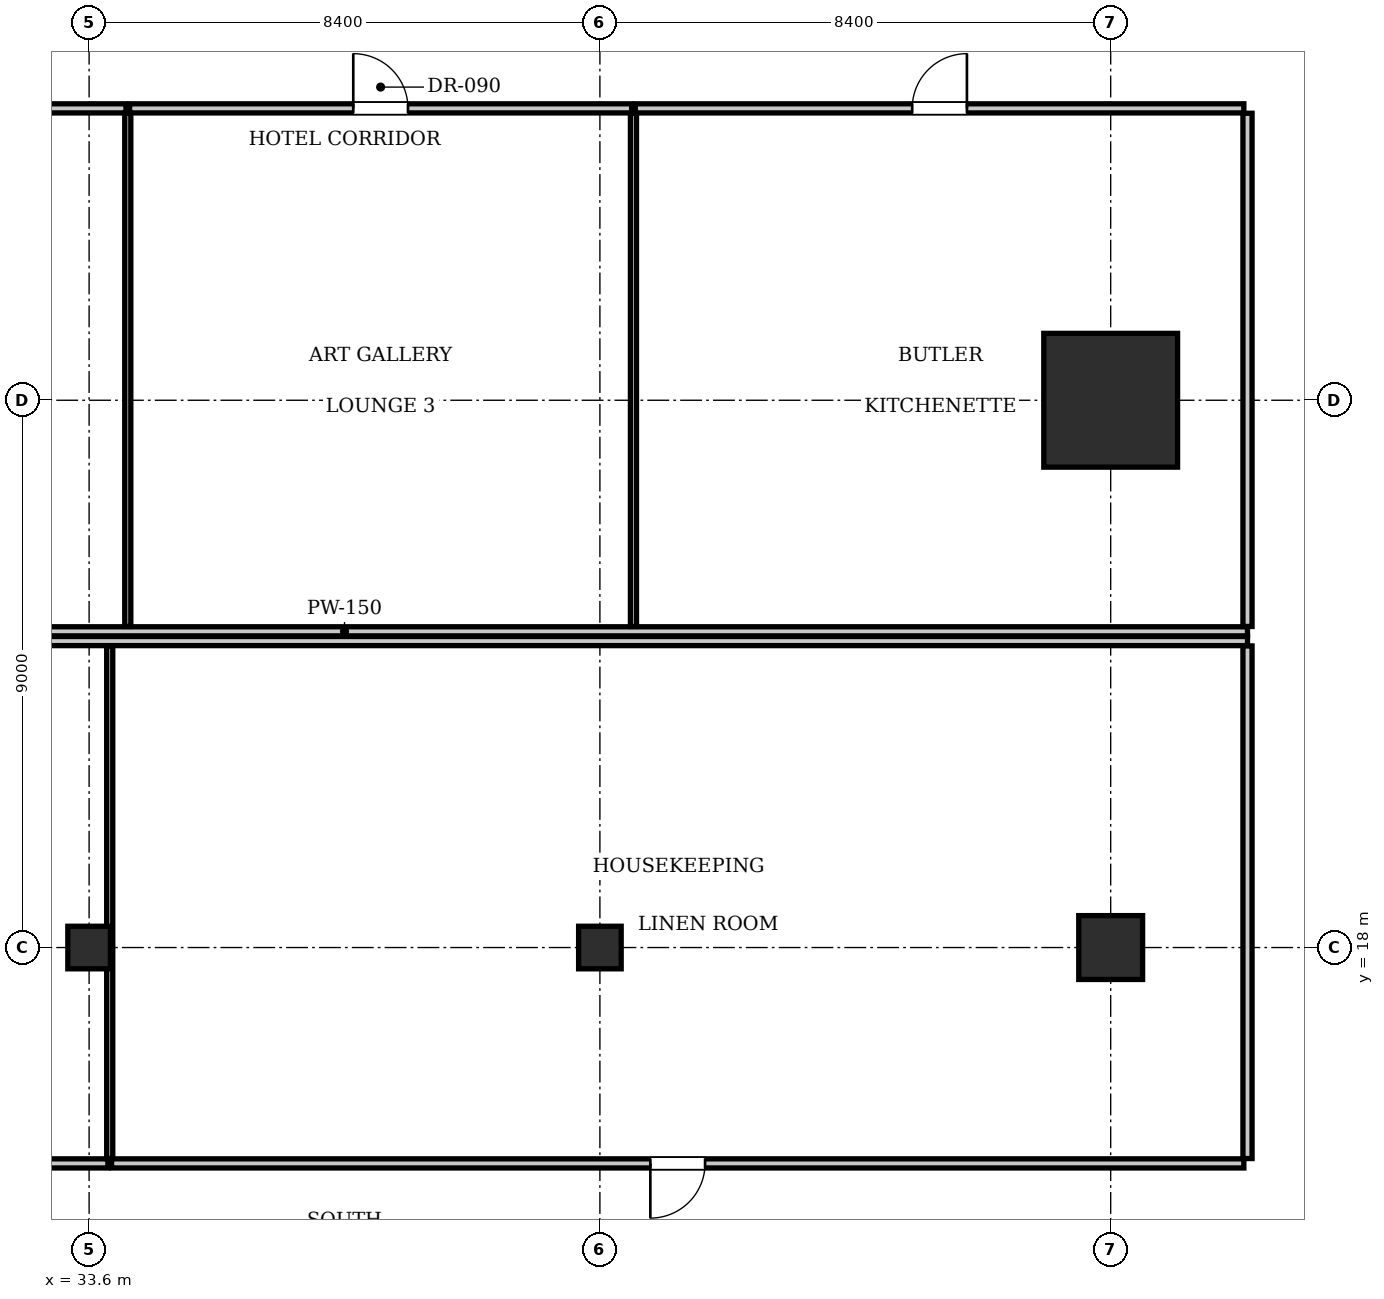
"""IFC4 building model, lengths in metres.
Left out: names, types, materials, properties, quantities, classifications, styles, units other than length and angle.
Written with IfcOpenShell. Run it as: python <this file> out.ifc"""

import sys

from ifc_helpers import new_model, si_unit, direction, frame, frame_2d, origin, origin_2d, place, context, subcontext, project, spatial, rectangle, i_section, extrude, element, fill, save


model = new_model("IFC4")
c1 = context("Model", 3, precision=1e-05, world=origin(), true_north=direction((0.0, 1.0)))
c2 = subcontext(c1, "Body", "Model", "MODEL_VIEW")
j1 = project(units=[si_unit("LENGTHUNIT", "METRE"), si_unit("PLANEANGLEUNIT", "RADIAN")], contexts=[c1])
p1 = place(None, origin())
s1 = spatial("IfcSite", under=j1, at=p1, CompositionType="ELEMENT")
p2 = place(p1, origin())
s2 = spatial("IfcBuilding", under=s1, at=p2, CompositionType="ELEMENT")
p3 = place(p2, frame((0.0, 0.0, 88.55)))
s3 = spatial("IfcBuildingStorey", under=s2, at=p3, CompositionType="ELEMENT", Elevation=88.55)
p4 = place(p3, frame((50.4, 27.0, 0.0), z_axis=(0.0, 0.0, 1.0), x_axis=(1.0, 0.0, 0.0)))
e1 = element("IfcColumn", 1, at=p4, inside=s3, PredefinedType="COLUMN", context=c2, shape_type="SweptSolid", body=[
    extrude(rectangle(XDim=2.2, YDim=2.2, at=origin_2d()), origin(), (0.0, 0.0, 1.0), 3.85),
])
p5 = place(p3, frame((50.4, 18.0, 0.0), z_axis=(0.0, 0.0, 1.0), x_axis=(1.0, 0.0, 0.0)))
e2 = element("IfcColumn", 2, at=p5, inside=s3, PredefinedType="COLUMN", context=c2, shape_type="SweptSolid", body=[
    extrude(rectangle(XDim=1.05, YDim=1.05, at=origin_2d()), origin(), (0.0, 0.0, 1.0), 3.85),
])
for number, where, z_axis, x_axis in (
    (3, (33.6, 18.0, 0.0), (0.0, 0.0, 1.0), (1.0, 0.0, 0.0)),
    (4, (42.0, 18.0, 0.0), (0.0, 0.0, 1.0), (1.0, 0.0, 0.0)),
):
    element("IfcColumn", number, at=place(p3, frame(where, z_axis=z_axis, x_axis=x_axis)), inside=s3, PredefinedType="COLUMN", context=c2, shape_type="SweptSolid", body=[
        extrude(i_section(OverallWidth=0.7, OverallDepth=0.7, WebThickness=0.028, FlangeThickness=0.044, at=origin_2d()), origin(), (0.0, 0.0, 1.0), 3.85),
    ])
p6 = place(p3, frame((22.95, 23.2, 0.0), z_axis=(0.0, 0.0, 1.0), x_axis=(1.0, 0.0, 0.0)))
e5 = element("IfcWall", 5, at=p6, inside=s3, PredefinedType="PARTITIONING", context=c2, shape_type="SweptSolid", body=[
    extrude(rectangle(XDim=29.7, YDim=0.15, at=frame_2d((14.85, 0.0))), origin(), (0.0, 0.0, 1.0), 3.61),
])
p7 = place(p3, frame((52.65, 23.28, 0.0), z_axis=(0.0, 0.0, 1.0), x_axis=(0.0, 1.0, 0.0)))
e6 = element("IfcWall", 6, at=p7, inside=s3, PredefinedType="PARTITIONING", context=c2, shape_type="SweptSolid", body=[
    extrude(rectangle(XDim=8.44, YDim=0.15, at=frame_2d((4.22, 0.0))), origin(), (0.0, 0.0, 1.0), 3.61),
])
p8 = place(p3, frame((27.732, 31.8, 0.0), z_axis=(0.0, 0.0, 1.0), x_axis=(1.0, 0.0, 0.0)))
e7 = element("IfcWall", 7, at=p8, inside=s3, PredefinedType="PARTITIONING", context=c2, shape_type="SweptSolid", body=[
    extrude(rectangle(XDim=6.474, YDim=0.15, at=frame_2d((3.237, 0.0))), origin(), (0.0, 0.0, 1.0), 3.61),
])
p9 = place(p8, frame((2.787, 0.0, 0.0)))
e8 = element("IfcOpeningElement", 8, at=p9, cuts=e7, PredefinedType="OPENING", context=c2, shape_type="SweptSolid", body=[
    extrude(rectangle(XDim=0.9, YDim=2.1, at=frame_2d((0.45, 1.05))), frame((0.0, 0.085, 0.0), z_axis=(0.0, -1.0, 0.0), x_axis=(1.0, 0.0, 0.0)), (0.0, 0.0, 1.0), 0.17),
])
p10 = place(p3, frame((34.236, 23.28, 0.0), z_axis=(0.0, 0.0, 1.0), x_axis=(0.0, 1.0, 0.0)))
e9 = element("IfcWall", 9, at=p10, inside=s3, PredefinedType="PARTITIONING", context=c2, shape_type="SweptSolid", body=[
    extrude(rectangle(XDim=8.44, YDim=0.1, at=frame_2d((4.22, 0.0))), origin(), (0.0, 0.0, 1.0), 3.61),
])
p11 = place(p3, frame((34.266, 31.8, 0.0), z_axis=(0.0, 0.0, 1.0), x_axis=(1.0, 0.0, 0.0)))
e10 = element("IfcWall", 10, at=p11, inside=s3, PredefinedType="PARTITIONING", context=c2, shape_type="SweptSolid", body=[
    extrude(rectangle(XDim=8.256, YDim=0.15, at=frame_2d((4.128, 0.0))), origin(), (0.0, 0.0, 1.0), 3.61),
])
p12 = place(p11, frame((3.678, 0.0, 0.0)))
e11 = element("IfcOpeningElement", 11, at=p12, cuts=e10, PredefinedType="OPENING", context=c2, shape_type="SweptSolid", body=[
    extrude(rectangle(XDim=0.9, YDim=2.1, at=frame_2d((0.45, 1.05))), frame((0.0, 0.085, 0.0), z_axis=(0.0, -1.0, 0.0), x_axis=(1.0, 0.0, 0.0)), (0.0, 0.0, 1.0), 0.17),
])
p13 = place(p3, frame((42.552, 23.28, 0.0), z_axis=(0.0, 0.0, 1.0), x_axis=(0.0, 1.0, 0.0)))
e12 = element("IfcWall", 12, at=p13, inside=s3, PredefinedType="PARTITIONING", context=c2, shape_type="SweptSolid", body=[
    extrude(rectangle(XDim=8.44, YDim=0.1, at=frame_2d((4.22, 0.0))), origin(), (0.0, 0.0, 1.0), 3.61),
])
p14 = place(p3, frame((42.582, 31.8, 0.0), z_axis=(0.0, 0.0, 1.0), x_axis=(1.0, 0.0, 0.0)))
e13 = element("IfcWall", 13, at=p14, inside=s3, PredefinedType="PARTITIONING", context=c2, shape_type="SweptSolid", body=[
    extrude(rectangle(XDim=10.008, YDim=0.15, at=frame_2d((5.004, 0.0))), origin(), (0.0, 0.0, 1.0), 3.61),
])
p15 = place(p14, frame((4.554, 0.0, 0.0)))
e14 = element("IfcOpeningElement", 14, at=p15, cuts=e13, PredefinedType="OPENING", context=c2, shape_type="SweptSolid", body=[
    extrude(rectangle(XDim=0.9, YDim=2.1, at=frame_2d((0.45, 1.05))), frame((0.0, 0.085, 0.0), z_axis=(0.0, -1.0, 0.0), x_axis=(1.0, 0.0, 0.0)), (0.0, 0.0, 1.0), 0.17),
])
p16 = place(p3, frame((22.95, 23.04, 0.0), z_axis=(0.0, 0.0, 1.0), x_axis=(1.0, 0.0, 0.0)))
e15 = element("IfcWall", 15, at=p16, inside=s3, PredefinedType="PARTITIONING", context=c2, shape_type="SweptSolid", body=[
    extrude(rectangle(XDim=29.7, YDim=0.15, at=frame_2d((14.85, 0.0))), origin(), (0.0, 0.0, 1.0), 3.61),
])
p17 = place(p3, frame((52.65, 14.53, 0.0), z_axis=(0.0, 0.0, 1.0), x_axis=(0.0, 1.0, 0.0)))
e16 = element("IfcWall", 16, at=p17, inside=s3, PredefinedType="PARTITIONING", context=c2, shape_type="SweptSolid", body=[
    extrude(rectangle(XDim=8.43, YDim=0.15, at=frame_2d((4.215, 0.0))), origin(), (0.0, 0.0, 1.0), 3.61),
])
p18 = place(p3, frame((23.01, 14.45, 0.0), z_axis=(0.0, 0.0, 1.0), x_axis=(1.0, 0.0, 0.0)))
e17 = element("IfcWall", 17, at=p18, inside=s3, PredefinedType="PARTITIONING", context=c2, shape_type="SweptSolid", body=[
    extrude(rectangle(XDim=10.899, YDim=0.15, at=frame_2d((5.449, 0.0))), origin(), (0.0, 0.0, 1.0), 3.61),
])
p19 = place(p18, frame((5.0, 0.0, 0.0)))
e18 = element("IfcOpeningElement", 18, at=p19, cuts=e17, PredefinedType="OPENING", context=c2, shape_type="SweptSolid", body=[
    extrude(rectangle(XDim=0.9, YDim=2.1, at=frame_2d((0.45, 1.05))), frame((0.0, 0.085, 0.0), z_axis=(0.0, -1.0, 0.0), x_axis=(1.0, 0.0, 0.0)), (0.0, 0.0, 1.0), 0.17),
])
p20 = place(p3, frame((33.939, 14.53, 0.0), z_axis=(0.0, 0.0, 1.0), x_axis=(0.0, 1.0, 0.0)))
e19 = element("IfcWall", 19, at=p20, inside=s3, PredefinedType="PARTITIONING", context=c2, shape_type="SweptSolid", body=[
    extrude(rectangle(XDim=8.43, YDim=0.1, at=frame_2d((4.215, 0.0))), origin(), (0.0, 0.0, 1.0), 3.61),
])
p21 = place(p3, frame((33.969, 14.45, 0.0), z_axis=(0.0, 0.0, 1.0), x_axis=(1.0, 0.0, 0.0)))
e20 = element("IfcWall", 20, at=p21, inside=s3, PredefinedType="PARTITIONING", context=c2, shape_type="SweptSolid", body=[
    extrude(rectangle(XDim=18.621, YDim=0.15, at=frame_2d((9.311, 0.0))), origin(), (0.0, 0.0, 1.0), 3.61),
])
p22 = place(p21, frame((8.861, 0.0, 0.0)))
e21 = element("IfcOpeningElement", 21, at=p22, cuts=e20, PredefinedType="OPENING", context=c2, shape_type="SweptSolid", body=[
    extrude(rectangle(XDim=0.9, YDim=2.1, at=frame_2d((0.45, 1.05))), frame((0.0, 0.085, 0.0), z_axis=(0.0, -1.0, 0.0), x_axis=(1.0, 0.0, 0.0)), (0.0, 0.0, 1.0), 0.17),
])
p23 = place(p12, origin())
e22 = element("IfcDoor", 22, at=p23, inside=s3, OperationType="SINGLE_SWING_LEFT", PredefinedType="DOOR", context=c2, shape_type="SweptSolid", body=[
    extrude(rectangle(XDim=0.9, YDim=2.1, at=frame_2d((0.45, 1.05))), frame((0.0, 0.025, 0.0), z_axis=(0.0, -1.0, 0.0), x_axis=(1.0, 0.0, 0.0)), (0.0, 0.0, 1.0), 0.05),
])
fill(e11, e22)
p24 = place(p15, origin())
e23 = element("IfcDoor", 23, at=p24, inside=s3, OperationType="SINGLE_SWING_RIGHT", PredefinedType="DOOR", context=c2, shape_type="SweptSolid", body=[
    extrude(rectangle(XDim=0.9, YDim=2.1, at=frame_2d((0.45, 1.05))), frame((0.0, 0.025, 0.0), z_axis=(0.0, -1.0, 0.0), x_axis=(1.0, 0.0, 0.0)), (0.0, 0.0, 1.0), 0.05),
])
fill(e14, e23)
p25 = place(p22, frame((0.9, 0.0, 0.0), z_axis=(0.0, 0.0, 1.0), x_axis=(-1.0, 0.0, 0.0)))
e24 = element("IfcDoor", 24, at=p25, inside=s3, OperationType="SINGLE_SWING_RIGHT", PredefinedType="DOOR", context=c2, shape_type="SweptSolid", body=[
    extrude(rectangle(XDim=0.9, YDim=2.1, at=frame_2d((0.45, 1.05))), frame((0.0, 0.025, 0.0), z_axis=(0.0, -1.0, 0.0), x_axis=(1.0, 0.0, 0.0)), (0.0, 0.0, 1.0), 0.05),
])
fill(e21, e24)
save(model, sys.argv[1])
